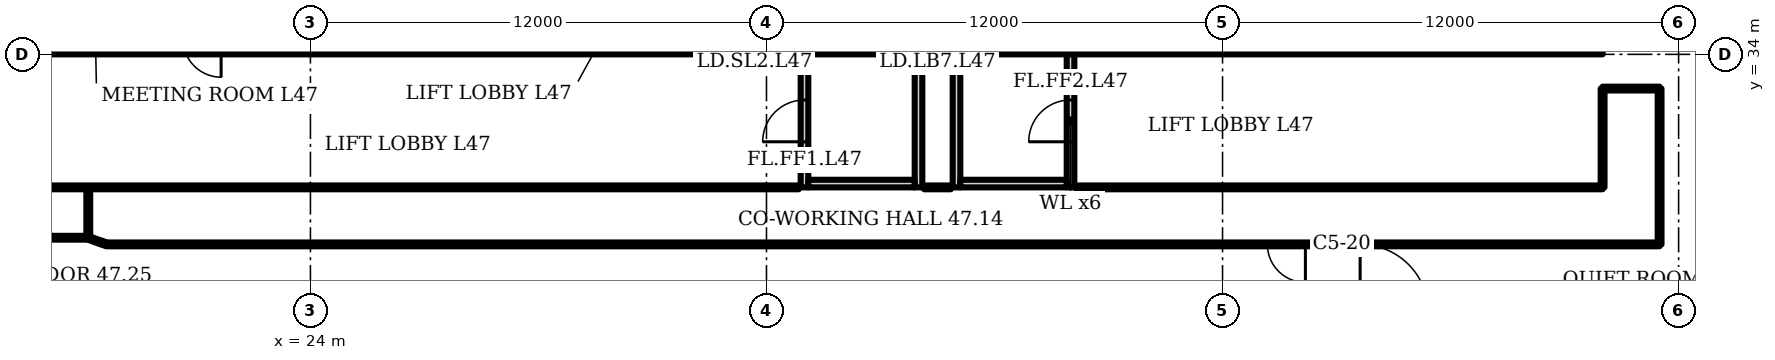
"""IFC4 building model, lengths in metres.
Left out: names, types, materials, properties, quantities, classifications, styles, units other than length and angle.
Written with IfcOpenShell. Run it as: python <this file> out.ifc"""

import sys

from ifc_helpers import new_model, si_unit, direction, frame, frame_2d, origin, place, context, subcontext, project, spatial, rectangle, extrude, element, fill, save


model = new_model("IFC4")
c1 = context("Model", 3, precision=1e-05, world=origin(), true_north=direction((0.0, 1.0)))
c2 = subcontext(c1, "Body", "Model", "MODEL_VIEW")
j1 = project(units=[si_unit("LENGTHUNIT", "METRE"), si_unit("PLANEANGLEUNIT", "RADIAN")], contexts=[c1])
p1 = place(None, origin())
s1 = spatial("IfcSite", under=j1, at=p1, CompositionType="ELEMENT")
p2 = place(p1, origin())
s2 = spatial("IfcBuilding", under=s1, at=p2, CompositionType="ELEMENT")
p3 = place(p2, frame((0.0, 0.0, 191.5)))
s3 = spatial("IfcBuildingStorey", under=s2, at=p3, CompositionType="ELEMENT", Elevation=191.5)
p4 = place(p3, frame((16.0, 34.4, 0.0), z_axis=(0.0, 0.0, 1.0), x_axis=(1.0, 0.0, 0.0)))
e1 = element("IfcWall", 1, at=p4, inside=s3, PredefinedType="SHEAR", context=c2, shape_type="SweptSolid", body=[
    extrude(rectangle(XDim=42.0, YDim=0.8, at=frame_2d((21.0, 0.0))), origin(), (0.0, 0.0, 1.0), 3.6),
])
p5 = place(p4, frame((1.75, 0.0, 0.0)))
e2 = element("IfcOpeningElement", 2, at=p5, cuts=e1, PredefinedType="OPENING", context=c2, shape_type="SweptSolid", body=[
    extrude(rectangle(XDim=1.0, YDim=2.1, at=frame_2d((0.5, 1.05))), frame((0.0, 0.41, 0.0), z_axis=(0.0, -1.0, 0.0), x_axis=(1.0, 0.0, 0.0)), (0.0, 0.0, 1.0), 0.82),
])
p6 = place(p4, frame((4.65, 0.0, 0.0)))
e3 = element("IfcOpeningElement", 3, at=p6, cuts=e1, PredefinedType="OPENING", context=c2, shape_type="SweptSolid", body=[
    extrude(rectangle(XDim=1.0, YDim=2.1, at=frame_2d((0.5, 1.05))), frame((0.0, 0.41, 0.0), z_axis=(0.0, -1.0, 0.0), x_axis=(1.0, 0.0, 0.0)), (0.0, 0.0, 1.0), 0.82),
])
p7 = place(p4, frame((7.65, 0.0, 0.0)))
e4 = element("IfcOpeningElement", 4, at=p7, cuts=e1, PredefinedType="OPENING", context=c2, shape_type="SweptSolid", body=[
    extrude(rectangle(XDim=1.2, YDim=2.1, at=frame_2d((0.6, 1.05))), frame((0.0, 0.41, 0.0), z_axis=(0.0, -1.0, 0.0), x_axis=(1.0, 0.0, 0.0)), (0.0, 0.0, 1.0), 0.82),
])
p8 = place(p4, frame((14.767, 0.0, 0.0)))
e5 = element("IfcOpeningElement", 5, at=p8, cuts=e1, PredefinedType="OPENING", context=c2, shape_type="SweptSolid", body=[
    extrude(rectangle(XDim=1.1, YDim=2.1, at=frame_2d((0.55, 1.05))), frame((0.0, 0.41, 0.0), z_axis=(0.0, -1.0, 0.0), x_axis=(1.0, 0.0, 0.0)), (0.0, 0.0, 1.0), 0.82),
])
p9 = place(p4, frame((19.133, 0.0, 0.0)))
e6 = element("IfcOpeningElement", 6, at=p9, cuts=e1, PredefinedType="OPENING", context=c2, shape_type="SweptSolid", body=[
    extrude(rectangle(XDim=1.1, YDim=2.1, at=frame_2d((0.55, 1.05))), frame((0.0, 0.41, 0.0), z_axis=(0.0, -1.0, 0.0), x_axis=(1.0, 0.0, 0.0)), (0.0, 0.0, 1.0), 0.82),
])
p10 = place(p4, frame((16.8, 0.0, 0.0)))
e7 = element("IfcOpeningElement", 7, at=p10, cuts=e1, PredefinedType="OPENING", context=c2, shape_type="SweptSolid", body=[
    extrude(rectangle(XDim=1.4, YDim=2.1, at=frame_2d((0.7, 1.05))), frame((0.0, 0.41, 0.0), z_axis=(0.0, -1.0, 0.0), x_axis=(1.0, 0.0, 0.0)), (0.0, 0.0, 1.0), 0.82),
])
p11 = place(p4, frame((21.767, 0.0, 0.0)))
e8 = element("IfcOpeningElement", 8, at=p11, cuts=e1, PredefinedType="OPENING", context=c2, shape_type="SweptSolid", body=[
    extrude(rectangle(XDim=1.1, YDim=2.1, at=frame_2d((0.55, 1.05))), frame((0.0, 0.41, 0.0), z_axis=(0.0, -1.0, 0.0), x_axis=(1.0, 0.0, 0.0)), (0.0, 0.0, 1.0), 0.82),
])
p12 = place(p4, frame((23.95, 0.0, 0.0)))
e9 = element("IfcOpeningElement", 9, at=p12, cuts=e1, PredefinedType="OPENING", context=c2, shape_type="SweptSolid", body=[
    extrude(rectangle(XDim=1.1, YDim=2.1, at=frame_2d((0.55, 1.05))), frame((0.0, 0.41, 0.0), z_axis=(0.0, -1.0, 0.0), x_axis=(1.0, 0.0, 0.0)), (0.0, 0.0, 1.0), 0.82),
])
p13 = place(p4, frame((26.133, 0.0, 0.0)))
e10 = element("IfcOpeningElement", 10, at=p13, cuts=e1, PredefinedType="OPENING", context=c2, shape_type="SweptSolid", body=[
    extrude(rectangle(XDim=1.1, YDim=2.1, at=frame_2d((0.55, 1.05))), frame((0.0, 0.41, 0.0), z_axis=(0.0, -1.0, 0.0), x_axis=(1.0, 0.0, 0.0)), (0.0, 0.0, 1.0), 0.82),
])
p14 = place(p4, frame((33.15, 0.0, 0.0)))
e11 = element("IfcOpeningElement", 11, at=p14, cuts=e1, PredefinedType="OPENING", context=c2, shape_type="SweptSolid", body=[
    extrude(rectangle(XDim=1.2, YDim=2.1, at=frame_2d((0.6, 1.05))), frame((0.0, 0.41, 0.0), z_axis=(0.0, -1.0, 0.0), x_axis=(1.0, 0.0, 0.0)), (0.0, 0.0, 1.0), 0.82),
])
p15 = place(p4, frame((37.767, 0.0, 0.0)))
e12 = element("IfcOpeningElement", 12, at=p15, cuts=e1, PredefinedType="OPENING", context=c2, shape_type="SweptSolid", body=[
    extrude(rectangle(XDim=1.4, YDim=2.1, at=frame_2d((0.7, 1.05))), frame((0.0, 0.41, 0.0), z_axis=(0.0, -1.0, 0.0), x_axis=(1.0, 0.0, 0.0)), (0.0, 0.0, 1.0), 0.82),
])
p16 = place(p3, frame((37.0, 30.5, 0.0), z_axis=(0.0, 0.0, 1.0), x_axis=(0.0, 1.0, 0.0)))
e13 = element("IfcWall", 13, at=p16, inside=s3, PredefinedType="PARTITIONING", context=c2, shape_type="SweptSolid", body=[
    extrude(rectangle(XDim=3.5, YDim=0.2, at=frame_2d((1.75, 0.0))), origin(), (0.0, 0.0, 1.0), 3.2),
])
p17 = place(p16, frame((1.2, 0.0, 0.0)))
e14 = element("IfcOpeningElement", 14, at=p17, cuts=e13, PredefinedType="OPENING", context=c2, shape_type="SweptSolid", body=[
    extrude(rectangle(XDim=1.1, YDim=2.1, at=frame_2d((0.55, 1.05))), frame((0.0, 0.11, 0.0), z_axis=(0.0, -1.0, 0.0), x_axis=(1.0, 0.0, 0.0)), (0.0, 0.0, 1.0), 0.22),
])
p18 = place(p3, frame((40.0, 30.5, 0.0), z_axis=(0.0, 0.0, 1.0), x_axis=(0.0, 1.0, 0.0)))
e15 = element("IfcWall", 15, at=p18, inside=s3, PredefinedType="PARTITIONING", context=c2, shape_type="SweptSolid", body=[
    extrude(rectangle(XDim=3.5, YDim=0.2, at=frame_2d((1.75, 0.0))), origin(), (0.0, 0.0, 1.0), 3.2),
])
p19 = place(p3, frame((37.1, 30.6, 0.0), z_axis=(0.0, 0.0, 1.0), x_axis=(1.0, 0.0, 0.0)))
e16 = element("IfcWall", 16, at=p19, inside=s3, PredefinedType="PARTITIONING", context=c2, shape_type="SweptSolid", body=[
    extrude(rectangle(XDim=2.8, YDim=0.2, at=frame_2d((1.4, 0.0))), origin(), (0.0, 0.0, 1.0), 3.2),
])
p20 = place(p3, frame((41.0, 30.5, 0.0), z_axis=(0.0, 0.0, 1.0), x_axis=(0.0, 1.0, 0.0)))
e17 = element("IfcWall", 17, at=p20, inside=s3, PredefinedType="PARTITIONING", context=c2, shape_type="SweptSolid", body=[
    extrude(rectangle(XDim=3.5, YDim=0.2, at=frame_2d((1.75, 0.0))), origin(), (0.0, 0.0, 1.0), 3.2),
])
p21 = place(p3, frame((44.0, 30.5, 0.0), z_axis=(0.0, 0.0, 1.0), x_axis=(0.0, 1.0, 0.0)))
e18 = element("IfcWall", 18, at=p21, inside=s3, PredefinedType="PARTITIONING", context=c2, shape_type="SweptSolid", body=[
    extrude(rectangle(XDim=3.5, YDim=0.2, at=frame_2d((1.75, 0.0))), origin(), (0.0, 0.0, 1.0), 3.2),
])
p22 = place(p21, frame((1.2, 0.0, 0.0)))
e19 = element("IfcOpeningElement", 19, at=p22, cuts=e18, PredefinedType="OPENING", context=c2, shape_type="SweptSolid", body=[
    extrude(rectangle(XDim=1.1, YDim=2.1, at=frame_2d((0.55, 1.05))), frame((0.0, 0.11, 0.0), z_axis=(0.0, -1.0, 0.0), x_axis=(1.0, 0.0, 0.0)), (0.0, 0.0, 1.0), 0.22),
])
p23 = place(p3, frame((41.1, 30.6, 0.0), z_axis=(0.0, 0.0, 1.0), x_axis=(1.0, 0.0, 0.0)))
e20 = element("IfcWall", 20, at=p23, inside=s3, PredefinedType="PARTITIONING", context=c2, shape_type="SweptSolid", body=[
    extrude(rectangle(XDim=2.8, YDim=0.2, at=frame_2d((1.4, 0.0))), origin(), (0.0, 0.0, 1.0), 3.2),
])
p24 = place(p3, frame((16.0, 30.5, 0.0), z_axis=(0.0, 0.0, 1.0), x_axis=(1.0, 0.0, 0.0)))
e21 = element("IfcWall", 21, at=p24, inside=s3, PredefinedType="PARTITIONING", context=c2, shape_type="SweptSolid", body=[
    extrude(rectangle(XDim=20.85, YDim=0.1, at=frame_2d((10.425, 0.0))), origin(), (0.0, 0.0, 1.0), 3.2),
])
p25 = place(p3, frame((17.185, 29.175, 0.0), z_axis=(0.0, 0.0, 1.0), x_axis=(1.0, 0.0, 0.0)))
e22 = element("IfcWall", 22, at=p25, inside=s3, PredefinedType="PARTITIONING", context=c2, shape_type="SweptSolid", body=[
    extrude(rectangle(XDim=0.97, YDim=0.1, at=frame_2d((0.485, 0.0))), origin(), (0.0, 0.0, 1.0), 3.2),
])
p26 = place(p3, frame((18.155, 29.18, 0.0), z_axis=(0.0, 0.0, 1.0), x_axis=(0.0, 1.0, 0.0)))
e23 = element("IfcWall", 23, at=p26, inside=s3, PredefinedType="PARTITIONING", context=c2, shape_type="SweptSolid", body=[
    extrude(rectangle(XDim=1.32, YDim=0.1, at=frame_2d((0.66, 0.0))), origin(), (0.0, 0.0, 1.0), 3.2),
])
p27 = place(p3, frame((18.49, 29.05, 0.0), z_axis=(0.0, 0.0, 1.0), x_axis=(-0.939932, 0.341351, 0.0)))
e24 = element("IfcWall", 24, at=p27, inside=s3, PredefinedType="PARTITIONING", context=c2, shape_type="SweptSolid", body=[
    extrude(rectangle(XDim=0.351, YDim=0.1, at=frame_2d((0.176, 0.0))), origin(), (0.0, 0.0, 1.0), 3.2),
])
p28 = place(p3, frame((18.635, 29.0, 0.0), z_axis=(0.0, 0.0, 1.0), x_axis=(-0.937648, 0.347591, 0.0)))
e25 = element("IfcWall", 25, at=p28, inside=s3, PredefinedType="PARTITIONING", context=c2, shape_type="SweptSolid", body=[
    extrude(rectangle(XDim=0.144, YDim=0.1, at=frame_2d((0.072, 0.0))), origin(), (0.0, 0.0, 1.0), 3.2),
])
p29 = place(p3, frame((18.635, 29.0, 0.0), z_axis=(0.0, 0.0, 1.0), x_axis=(1.0, 0.0, 0.0)))
e26 = element("IfcWall", 26, at=p29, inside=s3, PredefinedType="PARTITIONING", context=c2, shape_type="SweptSolid", body=[
    extrude(rectangle(XDim=40.865, YDim=0.1, at=frame_2d((20.433, 0.0))), origin(), (0.0, 0.0, 1.0), 3.2),
])
p30 = place(p29, frame((30.545, 0.0, 0.0)))
e27 = element("IfcOpeningElement", 27, at=p30, cuts=e26, PredefinedType="OPENING", context=c2, shape_type="SweptSolid", body=[
    extrude(rectangle(XDim=1.0, YDim=2.1, at=frame_2d((0.5, 1.05))), frame((0.0, 0.06, 0.0), z_axis=(0.0, -1.0, 0.0), x_axis=(1.0, 0.0, 0.0)), (0.0, 0.0, 1.0), 0.12),
])
p31 = place(p3, frame((58.0, 30.5, 0.0), z_axis=(0.0, 0.0, 1.0), x_axis=(0.0, 1.0, 0.0)))
e28 = element("IfcWall", 28, at=p31, inside=s3, PredefinedType="PARTITIONING", context=c2, shape_type="SweptSolid", body=[
    extrude(rectangle(XDim=2.6, YDim=0.1, at=frame_2d((1.3, 0.0))), origin(), (0.0, 0.0, 1.0), 3.2),
])
p32 = place(p3, frame((58.0, 33.1, 0.0), z_axis=(0.0, 0.0, 1.0), x_axis=(1.0, 0.0, 0.0)))
e29 = element("IfcWall", 29, at=p32, inside=s3, PredefinedType="PARTITIONING", context=c2, shape_type="SweptSolid", body=[
    extrude(rectangle(XDim=1.5, YDim=0.1, at=frame_2d((0.75, 0.0))), origin(), (0.0, 0.0, 1.0), 3.2),
])
p33 = place(p3, frame((59.5, 29.0, 0.0), z_axis=(0.0, 0.0, 1.0), x_axis=(0.0, 1.0, 0.0)))
e30 = element("IfcWall", 30, at=p33, inside=s3, PredefinedType="PARTITIONING", context=c2, shape_type="SweptSolid", body=[
    extrude(rectangle(XDim=4.1, YDim=0.1, at=frame_2d((2.05, 0.0))), origin(), (0.0, 0.0, 1.0), 3.2),
])
p34 = place(p3, frame((40.15, 30.5, 0.0), z_axis=(0.0, 0.0, 1.0), x_axis=(1.0, 0.0, 0.0)))
e31 = element("IfcWall", 31, at=p34, inside=s3, PredefinedType="PARTITIONING", context=c2, shape_type="SweptSolid", body=[
    extrude(rectangle(XDim=0.7, YDim=0.1, at=frame_2d((0.35, 0.0))), origin(), (0.0, 0.0, 1.0), 3.2),
])
p35 = place(p3, frame((44.15, 30.5, 0.0), z_axis=(0.0, 0.0, 1.0), x_axis=(1.0, 0.0, 0.0)))
e32 = element("IfcWall", 32, at=p35, inside=s3, PredefinedType="PARTITIONING", context=c2, shape_type="SweptSolid", body=[
    extrude(rectangle(XDim=13.85, YDim=0.1, at=frame_2d((6.925, 0.0))), origin(), (0.0, 0.0, 1.0), 3.2),
])
p36 = place(p5, origin())
e33 = element("IfcDoor", 33, at=p36, inside=s3, OperationType="SINGLE_SWING_LEFT", PredefinedType="DOOR", context=c2, shape_type="SweptSolid", body=[
    extrude(rectangle(XDim=1.0, YDim=2.1, at=frame_2d((0.5, 1.05))), frame((0.0, 0.4, 0.0), z_axis=(0.0, -1.0, 0.0), x_axis=(1.0, 0.0, 0.0)), (0.0, 0.0, 1.0), 0.8),
])
fill(e2, e33)
p37 = place(p6, origin())
e34 = element("IfcDoor", 34, at=p37, inside=s3, OperationType="SINGLE_SWING_RIGHT", PredefinedType="DOOR", context=c2, shape_type="SweptSolid", body=[
    extrude(rectangle(XDim=1.0, YDim=2.1, at=frame_2d((0.5, 1.05))), frame((0.0, 0.4, 0.0), z_axis=(0.0, -1.0, 0.0), x_axis=(1.0, 0.0, 0.0)), (0.0, 0.0, 1.0), 0.8),
])
fill(e3, e34)
p38 = place(p17, origin())
e35 = element("IfcDoor", 35, at=p38, inside=s3, OperationType="SINGLE_SWING_LEFT", PredefinedType="DOOR", context=c2, shape_type="SweptSolid", body=[
    extrude(rectangle(XDim=1.1, YDim=2.1, at=frame_2d((0.55, 1.05))), frame((0.0, 0.025, 0.0), z_axis=(0.0, -1.0, 0.0), x_axis=(1.0, 0.0, 0.0)), (0.0, 0.0, 1.0), 0.05),
])
fill(e14, e35)
p39 = place(p22, origin())
e36 = element("IfcDoor", 36, at=p39, inside=s3, OperationType="SINGLE_SWING_LEFT", PredefinedType="DOOR", context=c2, shape_type="SweptSolid", body=[
    extrude(rectangle(XDim=1.1, YDim=2.1, at=frame_2d((0.55, 1.05))), frame((0.0, 0.025, 0.0), z_axis=(0.0, -1.0, 0.0), x_axis=(1.0, 0.0, 0.0)), (0.0, 0.0, 1.0), 0.05),
])
fill(e19, e36)
p40 = place(p30, origin())
e37 = element("IfcDoor", 37, at=p40, inside=s3, OperationType="SINGLE_SWING_RIGHT", PredefinedType="DOOR", context=c2, shape_type="SweptSolid", body=[
    extrude(rectangle(XDim=1.0, YDim=2.1, at=frame_2d((0.5, 1.05))), frame((0.0, 0.025, 0.0), z_axis=(0.0, -1.0, 0.0), x_axis=(1.0, 0.0, 0.0)), (0.0, 0.0, 1.0), 0.05),
])
fill(e27, e37)
save(model, sys.argv[1])
